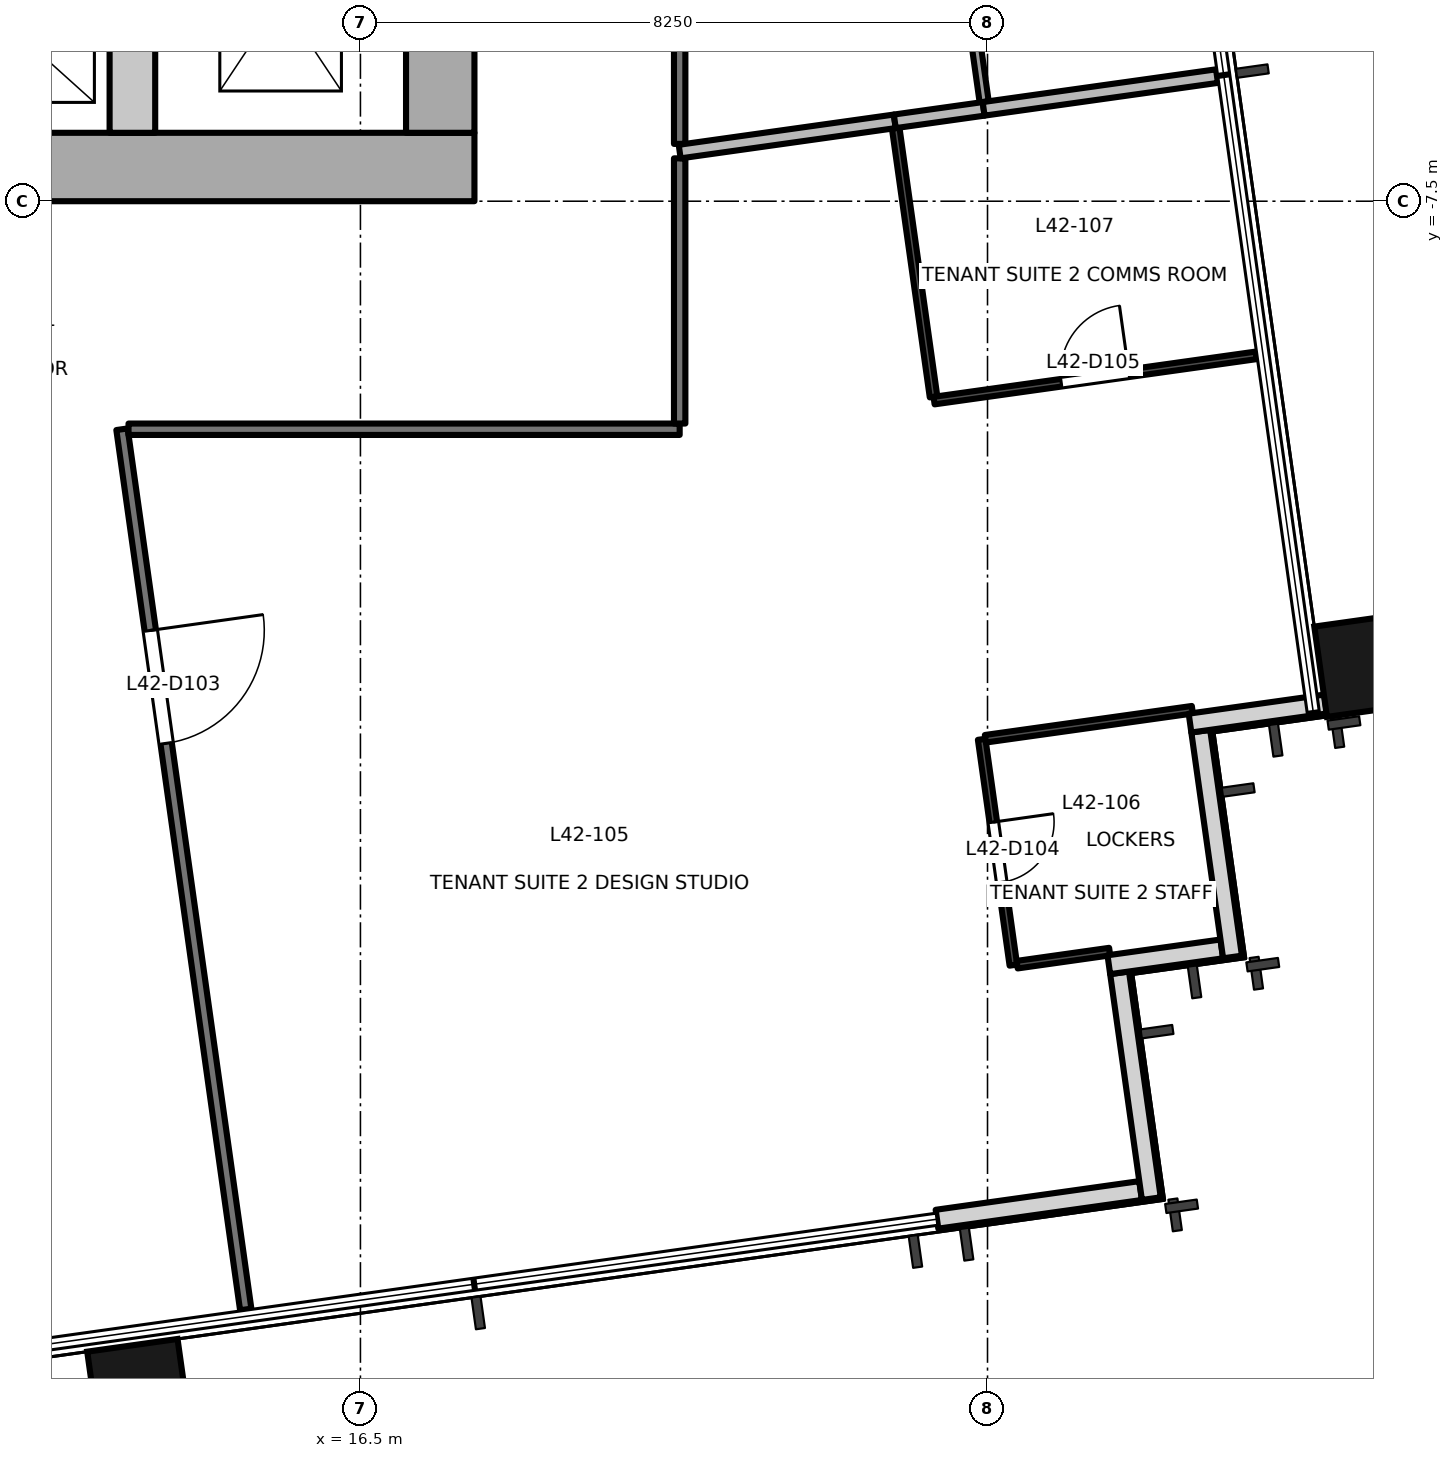
"""IFC4 building model, lengths in metres.
Left out: names, types, materials, properties, quantities, classifications, styles, units other than length and angle.
Written with IfcOpenShell. Run it as: python <this file> out.ifc"""

import sys

from ifc_helpers import new_model, si_unit, direction, frame, frame_2d, origin, origin_2d, place, context, subcontext, project, spatial, rectangle, extrude, element, fill, save


model = new_model("IFC4")
c1 = context("Model", 3, precision=1e-05, world=origin(), true_north=direction((0.0, 1.0)))
c2 = subcontext(c1, "Body", "Model", "MODEL_VIEW")
j1 = project(units=[si_unit("LENGTHUNIT", "METRE"), si_unit("PLANEANGLEUNIT", "RADIAN")], contexts=[c1])
p1 = place(None, origin())
s1 = spatial("IfcSite", under=j1, at=p1, CompositionType="ELEMENT")
p2 = place(p1, origin())
s2 = spatial("IfcBuilding", under=s1, at=p2, CompositionType="ELEMENT")
p3 = place(p2, frame((0.0, 0.0, 184.1)))
s3 = spatial("IfcBuildingStorey", under=s2, at=p3, CompositionType="ELEMENT", Elevation=184.1)
for number, where, z_axis, x_axis in (
    (1, (13.625, -23.443, -0.2), (0.0, 0.0, 1.0), (0.99, 0.139, 0.0)),
    (2, (30.024, -13.565, -0.2), (0.0, 0.0, 1.0), (-0.139, 0.99, 0.0)),
):
    element("IfcColumn", number, at=place(p3, frame(where, z_axis=z_axis, x_axis=x_axis)), inside=s3, PredefinedType="COLUMN", context=c2, shape_type="SweptSolid", body=[
        extrude(rectangle(XDim=1.2, YDim=1.8, at=origin_2d()), origin(), (0.0, 0.0, 1.0), 3.9),
    ])
p4 = place(p3, frame((24.085, -20.893, 0.0), z_axis=(0.0, 0.0, 1.0), x_axis=(0.990255800966, 0.139260362823, 0.0)))
e3 = element("IfcWall", 3, at=p4, inside=s3, PredefinedType="SOLIDWALL", context=c2, shape_type="SweptSolid", body=[
    extrude(rectangle(XDim=2.705, YDim=0.25, at=frame_2d((1.353, 0.0))), origin(), (0.0, 0.0, 1.0), 3.7),
])
p5 = place(p3, frame((26.905, -20.622, 0.0), z_axis=(0.0, 0.0, 1.0), x_axis=(-0.139313431826, 0.990248336385, 0.0)))
e4 = element("IfcWall", 4, at=p5, inside=s3, PredefinedType="SOLIDWALL", context=c2, shape_type="SweptSolid", body=[
    extrude(rectangle(XDim=3.0, YDim=0.25, at=frame_2d((1.5, 0.0))), origin(), (0.0, 0.0, 1.0), 3.7),
])
p6 = place(p3, frame((26.346, -17.544, 0.0), z_axis=(0.0, 0.0, 1.0), x_axis=(0.990368090482, 0.13845954411, 0.0)))
e5 = element("IfcWall", 5, at=p6, inside=s3, PredefinedType="SOLIDWALL", context=c2, shape_type="SweptSolid", body=[
    extrude(rectangle(XDim=1.5, YDim=0.25, at=frame_2d((0.75, 0.0))), origin(), (0.0, 0.0, 1.0), 3.7),
])
p7 = place(p3, frame((27.973, -17.443, 0.0), z_axis=(0.0, 0.0, 1.0), x_axis=(-0.139313431826, 0.990248336385, 0.0)))
e6 = element("IfcWall", 6, at=p7, inside=s3, PredefinedType="SOLIDWALL", context=c2, shape_type="SweptSolid", body=[
    extrude(rectangle(XDim=3.0, YDim=0.25, at=frame_2d((1.5, 0.0))), origin(), (0.0, 0.0, 1.0), 3.7),
])
p8 = place(p3, frame((27.414, -14.366, 0.0), z_axis=(0.0, 0.0, 1.0), x_axis=(0.990256286673, 0.139256908998, 0.0)))
e7 = element("IfcWall", 7, at=p8, inside=s3, PredefinedType="SOLIDWALL", context=c2, shape_type="SweptSolid", body=[
    extrude(rectangle(XDim=1.801, YDim=0.25, at=frame_2d((0.9, 0.0))), origin(), (0.0, 0.0, 1.0), 3.7),
])
p9 = place(p3, frame((-18.0, -7.05, -0.2), z_axis=(0.0, 0.0, 1.0), x_axis=(1.0, 0.0, 0.0)))
e8 = element("IfcWall", 8, at=p9, inside=s3, PredefinedType="SHEAR", context=c2, shape_type="SweptSolid", body=[
    extrude(rectangle(XDim=36.0, YDim=0.9, at=frame_2d((18.0, 0.0))), origin(), (0.0, 0.0, 1.0), 3.9),
])
p10 = place(p9, frame((11.3, 0.0, 0.2)))
e9 = element("IfcOpeningElement", 9, at=p10, cuts=e8, PredefinedType="OPENING", context=c2, shape_type="SweptSolid", body=[
    extrude(rectangle(XDim=1.8, YDim=2.1, at=frame_2d((0.9, 1.05))), frame((0.0, 0.46, 0.0), z_axis=(0.0, -1.0, 0.0), x_axis=(1.0, 0.0, 0.0)), (0.0, 0.0, 1.0), 0.921),
])
p11 = place(p9, frame((16.8, 0.0, 0.2)))
e10 = element("IfcOpeningElement", 10, at=p11, cuts=e8, PredefinedType="OPENING", context=c2, shape_type="SweptSolid", body=[
    extrude(rectangle(XDim=2.4, YDim=2.1, at=frame_2d((1.2, 1.05))), frame((0.0, 0.46, 0.0), z_axis=(0.0, -1.0, 0.0), x_axis=(1.0, 0.0, 0.0)), (0.0, 0.0, 1.0), 0.921),
])
p12 = place(p9, frame((26.1, 0.0, 0.2)))
e11 = element("IfcOpeningElement", 11, at=p12, cuts=e8, PredefinedType="OPENING", context=c2, shape_type="SweptSolid", body=[
    extrude(rectangle(XDim=2.4, YDim=2.1, at=frame_2d((1.2, 1.05))), frame((0.0, 0.46, 0.0), z_axis=(0.0, -1.0, 0.0), x_axis=(1.0, 0.0, 0.0)), (0.0, 0.0, 1.0), 0.921),
])
p13 = place(p3, frame((17.55, -6.6, -0.2), z_axis=(0.0, 0.0, 1.0), x_axis=(0.0, 1.0, 0.0)))
e12 = element("IfcWall", 12, at=p13, inside=s3, PredefinedType="SHEAR", context=c2, shape_type="SweptSolid", body=[
    extrude(rectangle(XDim=13.2, YDim=0.9, at=frame_2d((6.6, 0.0))), origin(), (0.0, 0.0, 1.0), 3.9),
])
p14 = place(p13, frame((4.55, 0.0, 0.2)))
e13 = element("IfcOpeningElement", 13, at=p14, cuts=e12, PredefinedType="OPENING", context=c2, shape_type="SweptSolid", body=[
    extrude(rectangle(XDim=1.2, YDim=2.1, at=frame_2d((0.6, 1.05))), frame((0.0, 0.46, 0.0), z_axis=(0.0, -1.0, 0.0), x_axis=(1.0, 0.0, 0.0)), (0.0, 0.0, 1.0), 0.921),
])
p15 = place(p3, frame((13.5, -6.6, -0.2), z_axis=(0.0, 0.0, 1.0), x_axis=(0.0, 1.0, 0.0)))
e14 = element("IfcWall", 14, at=p15, inside=s3, PredefinedType="SHEAR", context=c2, shape_type="SweptSolid", body=[
    extrude(rectangle(XDim=13.2, YDim=0.6, at=frame_2d((6.6, 0.0))), origin(), (0.0, 0.0, 1.0), 3.9),
])
p16 = place(p3, frame((13.363, -10.5, 0.0), z_axis=(0.0, 0.0, 1.0), x_axis=(0.139211326844, -0.990262695692, 0.0)))
e15 = element("IfcWall", 15, at=p16, inside=s3, PredefinedType="PARTITIONING", context=c2, shape_type="SweptSolid", body=[
    extrude(rectangle(XDim=11.694, YDim=0.15, at=frame_2d((5.847, 0.0))), origin(), (0.0, 0.0, 1.0), 3.1),
])
p17 = place(p16, frame((2.673, 0.0, 0.0)))
e16 = element("IfcOpeningElement", 16, at=p17, cuts=e15, PredefinedType="OPENING", context=c2, shape_type="SweptSolid", body=[
    extrude(rectangle(XDim=1.5, YDim=2.1, at=frame_2d((0.75, 1.05))), frame((0.0, 0.085, 0.0), z_axis=(0.0, -1.0, 0.0), x_axis=(1.0, 0.0, 0.0)), (0.0, 0.0, 1.0), 0.171),
])
p18 = place(p3, frame((20.7, -10.5, 0.0), z_axis=(0.0, 0.0, 1.0), x_axis=(-1.0, 0.0, 0.0)))
e17 = element("IfcWall", 17, at=p18, inside=s3, PredefinedType="PARTITIONING", context=c2, shape_type="SweptSolid", body=[
    extrude(rectangle(XDim=7.251, YDim=0.15, at=frame_2d((3.625, 0.0))), origin(), (0.0, 0.0, 1.0), 3.1),
])
p19 = place(p3, frame((20.7, -6.936, 0.0), z_axis=(0.0, 0.0, 1.0), x_axis=(0.0, -1.0, 0.0)))
e18 = element("IfcWall", 18, at=p19, inside=s3, PredefinedType="PARTITIONING", context=c2, shape_type="SweptSolid", body=[
    extrude(rectangle(XDim=3.489, YDim=0.15, at=frame_2d((1.745, 0.0))), origin(), (0.0, 0.0, 1.0), 3.7),
])
p20 = place(p3, frame((20.7, 4.576, 0.0), z_axis=(0.0, 0.0, 1.0), x_axis=(0.0, -1.0, 0.0)))
e19 = element("IfcWall", 19, at=p20, inside=s3, PredefinedType="PARTITIONING", context=c2, shape_type="SweptSolid", body=[
    extrude(rectangle(XDim=11.322, YDim=0.15, at=frame_2d((5.661, 0.0))), origin(), (0.0, 0.0, 1.0), 3.25),
])
p21 = place(p20, frame((7.691, 0.0, 0.0)))
e20 = element("IfcOpeningElement", 20, at=p21, cuts=e19, PredefinedType="OPENING", context=c2, shape_type="SweptSolid", body=[
    extrude(rectangle(XDim=0.9, YDim=2.1, at=frame_2d((0.45, 1.05))), frame((0.0, 0.085, 0.0), z_axis=(0.0, -1.0, 0.0), x_axis=(1.0, 0.0, 0.0)), (0.0, 0.0, 1.0), 0.171),
])
p22 = place(p3, frame((24.673, -14.579, 0.0), z_axis=(0.0, 0.0, 1.0), x_axis=(0.138994228812, -0.990293191109, 0.0)))
e21 = element("IfcWall", 21, at=p22, inside=s3, PredefinedType="PARTITIONING", context=c2, shape_type="SweptSolid", body=[
    extrude(rectangle(XDim=3.0, YDim=0.1, at=frame_2d((1.5, 0.0))), origin(), (0.0, 0.0, 1.0), 3.7),
])
p23 = place(p22, frame((1.1, 0.0, 0.0)))
e22 = element("IfcOpeningElement", 22, at=p23, cuts=e21, PredefinedType="OPENING", context=c2, shape_type="SweptSolid", body=[
    extrude(rectangle(XDim=0.8, YDim=2.1, at=frame_2d((0.4, 1.05))), frame((0.0, 0.061, 0.0), z_axis=(0.0, -1.0, 0.0), x_axis=(1.0, 0.0, 0.0)), (0.0, 0.0, 1.0), 0.121),
])
p24 = place(p3, frame((25.14, -17.544, 0.0), z_axis=(0.0, 0.0, 1.0), x_axis=(0.990174663817, 0.139836100968, 0.0)))
e23 = element("IfcWall", 23, at=p24, inside=s3, PredefinedType="PARTITIONING", context=c2, shape_type="SweptSolid", body=[
    extrude(rectangle(XDim=1.229, YDim=0.1, at=frame_2d((0.615, 0.0))), origin(), (0.0, 0.0, 1.0), 3.7),
])
p25 = place(p3, frame((27.445, -14.19, 0.0), z_axis=(0.0, 0.0, 1.0), x_axis=(-0.990299764824, -0.138947384969, 0.0)))
e24 = element("IfcWall", 24, at=p25, inside=s3, PredefinedType="PARTITIONING", context=c2, shape_type="SweptSolid", body=[
    extrude(rectangle(XDim=2.75, YDim=0.1, at=frame_2d((1.375, 0.0))), origin(), (0.0, 0.0, 1.0), 3.7),
])
p26 = place(p3, frame((23.542, -6.538, 0.0), z_axis=(0.0, 0.0, 1.0), x_axis=(0.139477964322, -0.990225175134, 0.0)))
e25 = element("IfcWall", 25, at=p26, inside=s3, PredefinedType="PARTITIONING", context=c2, shape_type="SweptSolid", body=[
    extrude(rectangle(XDim=3.571, YDim=0.1, at=frame_2d((1.785, 0.0))), origin(), (0.0, 0.0, 1.0), 3.7),
])
p27 = place(p3, frame((24.047, -10.123, 0.0), z_axis=(0.0, 0.0, 1.0), x_axis=(0.990283364174, 0.139064224876, 0.0)))
e26 = element("IfcWall", 26, at=p27, inside=s3, PredefinedType="PARTITIONING", context=c2, shape_type="SweptSolid", body=[
    extrude(rectangle(XDim=4.278, YDim=0.1, at=frame_2d((2.139, 0.0))), origin(), (0.0, 0.0, 1.0), 3.7),
])
p28 = place(p27, frame((1.689, 0.0, 0.0)))
e27 = element("IfcOpeningElement", 27, at=p28, cuts=e26, PredefinedType="OPENING", context=c2, shape_type="SweptSolid", body=[
    extrude(rectangle(XDim=0.9, YDim=2.1, at=frame_2d((0.45, 1.05))), frame((0.0, 0.061, 0.0), z_axis=(0.0, -1.0, 0.0), x_axis=(1.0, 0.0, 0.0)), (0.0, 0.0, 1.0), 0.121),
])
p29 = place(p3, frame((20.7, -6.847, 0.0), z_axis=(0.0, 0.0, 1.0), x_axis=(0.990258051292, 0.139244360214, 0.0)))
e28 = element("IfcWall", 28, at=p29, inside=s3, PredefinedType="PARTITIONING", context=c2, shape_type="SweptSolid", body=[
    extrude(rectangle(XDim=2.858, YDim=0.18, at=frame_2d((1.429, 0.0))), origin(), (0.0, 0.0, 1.0), 3.7),
])
p30 = place(p3, frame((23.53, -6.449, 0.0), z_axis=(0.0, 0.0, 1.0), x_axis=(0.990293977152, 0.138988628372, 0.0)))
e29 = element("IfcWall", 29, at=p30, inside=s3, PredefinedType="PARTITIONING", context=c2, shape_type="SweptSolid", body=[
    extrude(rectangle(XDim=1.18, YDim=0.18, at=frame_2d((0.59, 0.0))), origin(), (0.0, 0.0, 1.0), 3.7),
])
p31 = place(p3, frame((24.699, -6.285, 0.0), z_axis=(0.0, 0.0, 1.0), x_axis=(0.990293026317, 0.138995402899, 0.0)))
e30 = element("IfcWall", 30, at=p31, inside=s3, PredefinedType="PARTITIONING", context=c2, shape_type="SweptSolid", body=[
    extrude(rectangle(XDim=3.1, YDim=0.18, at=frame_2d((1.55, 0.0))), origin(), (0.0, 0.0, 1.0), 3.7),
])
p32 = place(p3, frame((24.309, -3.371, 0.0), z_axis=(0.0, 0.0, 1.0), x_axis=(0.139298147854, -0.990250486495, 0.0)))
e31 = element("IfcWall", 31, at=p32, inside=s3, PredefinedType="PARTITIONING", context=c2, shape_type="SweptSolid", body=[
    extrude(rectangle(XDim=2.85, YDim=0.12, at=frame_2d((1.425, 0.0))), origin(), (0.0, 0.0, 1.0), 3.25),
])
p33 = place(p17, origin())
e32 = element("IfcDoor", 32, at=p33, inside=s3, OperationType="DOUBLE_DOOR_SINGLE_SWING", PredefinedType="DOOR", context=c2, shape_type="SweptSolid", body=[
    extrude(rectangle(XDim=1.5, YDim=2.1, at=frame_2d((0.75, 1.05))), frame((0.0, 0.025, 0.0), z_axis=(0.0, -1.0, 0.0), x_axis=(1.0, 0.0, 0.0)), (0.0, 0.0, 1.0), 0.05),
])
fill(e16, e32)
p34 = place(p23, origin())
e33 = element("IfcDoor", 33, at=p34, inside=s3, OperationType="SINGLE_SWING_LEFT", PredefinedType="DOOR", context=c2, shape_type="SweptSolid", body=[
    extrude(rectangle(XDim=0.8, YDim=2.1, at=frame_2d((0.4, 1.05))), frame((0.0, 0.025, 0.0), z_axis=(0.0, -1.0, 0.0), x_axis=(1.0, 0.0, 0.0)), (0.0, 0.0, 1.0), 0.05),
])
fill(e22, e33)
p35 = place(p28, origin())
e34 = element("IfcDoor", 34, at=p35, inside=s3, OperationType="SINGLE_SWING_RIGHT", PredefinedType="DOOR", context=c2, shape_type="SweptSolid", body=[
    extrude(rectangle(XDim=0.9, YDim=2.1, at=frame_2d((0.45, 1.05))), frame((0.0, 0.025, 0.0), z_axis=(0.0, -1.0, 0.0), x_axis=(1.0, 0.0, 0.0)), (0.0, 0.0, 1.0), 0.05),
])
fill(e27, e34)
save(model, sys.argv[1])
